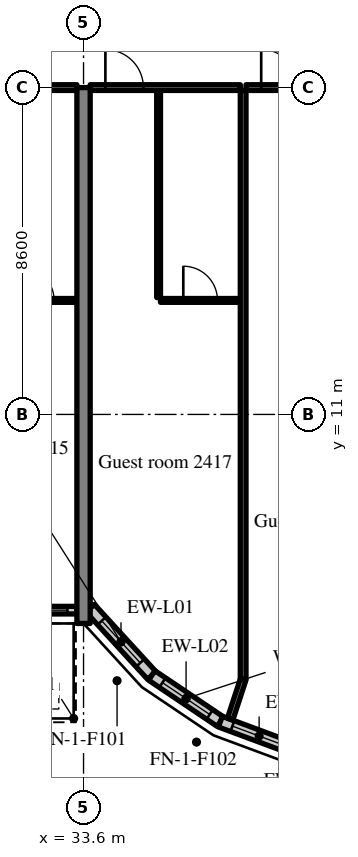
"""IFC4 building model, lengths in metres.
Left out: names, types, materials, properties, quantities, classifications, styles, units other than length and angle.
Written with IfcOpenShell. Run it as: python <this file> out.ifc"""

import sys

from ifc_helpers import new_model, si_unit, direction, frame, frame_2d, origin, place, context, subcontext, project, spatial, rectangle, extrude, source, transform, mapped, element, fill, save


model = new_model("IFC4")
c1 = context("Model", 3, precision=1e-05, world=origin(), true_north=direction((0.0, 1.0)))
c2 = subcontext(c1, "Body", "Model", "MODEL_VIEW")
j1 = project(units=[si_unit("LENGTHUNIT", "METRE"), si_unit("PLANEANGLEUNIT", "RADIAN")], contexts=[c1])
p1 = place(None, origin())
s1 = spatial("IfcSite", under=j1, at=p1, CompositionType="ELEMENT")
p2 = place(p1, origin())
s2 = spatial("IfcBuilding", under=s1, at=p2, CompositionType="ELEMENT")
p3 = place(p2, frame((0.0, 0.0, 102.8)))
s3 = spatial("IfcBuildingStorey", under=s2, at=p3, CompositionType="ELEMENT", Elevation=102.8)
m1 = source(origin(), c2, "Body", "SweptSolid", [
    extrude(rectangle(XDim=14.1, YDim=0.35, at=frame_2d((7.05, 0.0))), origin(), (0.0, 0.0, 1.0), 3.52),
])
p4 = place(p3, frame((33.6, 5.5, 0.0), z_axis=(0.0, 0.0, 1.0), x_axis=(0.0, 1.0, 0.0)))
e1 = element("IfcWall", 1, at=p4, inside=s3, PredefinedType="SHEAR", context=c2, shape_type="MappedRepresentation", body=[
    mapped(m1, transform((0.0, 0.0, 0.0), scale=1.0)),
])
m2 = source(origin(), c2, "Body", "SweptSolid", [
    extrude(rectangle(XDim=8.05, YDim=0.2, at=frame_2d((4.025, 0.0))), origin(), (0.0, 0.0, 1.0), 2.82),
])
p5 = place(p3, frame((25.375, 5.85, 0.0), z_axis=(0.0, 0.0, 1.0), x_axis=(1.0, 0.0, 0.0)))
e2 = element("IfcWall", 2, at=p5, inside=s3, PredefinedType="SOLIDWALL", context=c2, shape_type="MappedRepresentation", body=[
    mapped(m2, transform((0.0, 0.0, 0.0), scale=1.0)),
])
m3 = source(origin(), c2, "Body", "SweptSolid", [
    extrude(rectangle(XDim=1.2, YDim=2.4, at=frame_2d((0.6, 1.2))), frame((0.0, 0.11, 0.0), z_axis=(0.0, -1.0, 0.0), x_axis=(1.0, 0.0, 0.0)), (0.0, 0.0, 1.0), 0.22),
])
p6 = place(p5, frame((0.25, 0.0, 0.0)))
e3 = element("IfcOpeningElement", 3, at=p6, cuts=e2, PredefinedType="OPENING", context=c2, shape_type="MappedRepresentation", body=[
    mapped(m3, transform((0.0, 0.0, 0.0), scale=1.0)),
])
m4 = source(origin(), c2, "Body", "SweptSolid", [
    extrude(rectangle(XDim=1.5, YDim=1.5, at=frame_2d((0.75, 0.75))), frame((0.0, 0.11, 0.0), z_axis=(0.0, -1.0, 0.0), x_axis=(1.0, 0.0, 0.0)), (0.0, 0.0, 1.0), 0.22),
])
p7 = place(p5, frame((2.275, 0.0, 0.9)))
e4 = element("IfcOpeningElement", 4, at=p7, cuts=e2, PredefinedType="OPENING", context=c2, shape_type="MappedRepresentation", body=[
    mapped(m4, transform((0.0, 0.0, 0.0), scale=1.0)),
])
p8 = place(p5, frame((4.275, 0.0, 0.0)))
e5 = element("IfcOpeningElement", 5, at=p8, cuts=e2, PredefinedType="OPENING", context=c2, shape_type="MappedRepresentation", body=[
    mapped(m3, transform((0.0, 0.0, 0.0), scale=1.0)),
])
p9 = place(p5, frame((6.3, 0.0, 0.9)))
e6 = element("IfcOpeningElement", 6, at=p9, cuts=e2, PredefinedType="OPENING", context=c2, shape_type="MappedRepresentation", body=[
    mapped(m4, transform((0.0, 0.0, 0.0), scale=1.0)),
])
m5 = source(origin(), c2, "Body", "SweptSolid", [
    extrude(rectangle(XDim=2.398, YDim=0.3, at=frame_2d((1.199, 0.0))), origin(), (0.0, 0.0, 1.0), 3.52),
])
p10 = place(p3, frame((33.776, 5.9, 0.0), z_axis=(0.0, 0.0, 1.0), x_axis=(0.675374189419, -0.737475222815, 0.0)))
e7 = element("IfcWall", 7, at=p10, inside=s3, PredefinedType="SOLIDWALL", context=c2, shape_type="MappedRepresentation", body=[
    mapped(m5, transform((0.0, 0.0, 0.0), scale=1.0)),
])
m6 = source(origin(), c2, "Body", "SweptSolid", [
    extrude(rectangle(XDim=1.5, YDim=2.0, at=frame_2d((0.75, 1.0))), frame((0.0, 0.16, 0.0), z_axis=(0.0, -1.0, 0.0), x_axis=(1.0, 0.0, 0.0)), (0.0, 0.0, 1.0), 0.32),
])
p11 = place(p10, frame((0.449, 0.0, 0.9)))
e8 = element("IfcOpeningElement", 8, at=p11, cuts=e7, PredefinedType="OPENING", context=c2, shape_type="MappedRepresentation", body=[
    mapped(m6, transform((0.0, 0.0, 0.0), scale=1.0)),
])
m7 = source(origin(), c2, "Body", "SweptSolid", [
    extrude(rectangle(XDim=2.176, YDim=0.3, at=frame_2d((1.088, 0.0))), origin(), (0.0, 0.0, 1.0), 3.52),
])
p12 = place(p3, frame((35.396, 4.131, 0.0), z_axis=(0.0, 0.0, 1.0), x_axis=(0.829590746428, -0.558371913192, 0.0)))
e9 = element("IfcWall", 9, at=p12, inside=s3, PredefinedType="SOLIDWALL", context=c2, shape_type="MappedRepresentation", body=[
    mapped(m7, transform((0.0, 0.0, 0.0), scale=1.0)),
])
p13 = place(p12, frame((0.338, 0.0, 0.9)))
e10 = element("IfcOpeningElement", 10, at=p13, cuts=e9, PredefinedType="OPENING", context=c2, shape_type="MappedRepresentation", body=[
    mapped(m6, transform((0.0, 0.0, 0.0), scale=1.0)),
])
p14 = place(p3, frame((37.201, 2.917, 0.0), z_axis=(0.0, 0.0, 1.0), x_axis=(0.93754555999, -0.347862505801, 0.0)))
e11 = element("IfcWall", 11, at=p14, inside=s3, PredefinedType="SOLIDWALL", context=c2, shape_type="MappedRepresentation", body=[
    mapped(m7, transform((0.0, 0.0, 0.0), scale=1.0)),
])
p15 = place(p14, frame((0.338, 0.0, 0.9)))
e12 = element("IfcOpeningElement", 12, at=p15, cuts=e11, PredefinedType="OPENING", context=c2, shape_type="MappedRepresentation", body=[
    mapped(m6, transform((0.0, 0.0, 0.0), scale=1.0)),
])
m8 = source(origin(), c2, "Body", "SweptSolid", [
    extrude(rectangle(XDim=2.1, YDim=0.1, at=frame_2d((1.05, 0.0))), origin(), (0.0, 0.0, 1.0), 3.52),
])
p16 = place(p3, frame((31.325, 14.0, 0.0), z_axis=(0.0, 0.0, 1.0), x_axis=(1.0, 0.0, 0.0)))
e13 = element("IfcWall", 13, at=p16, inside=s3, PredefinedType="PARTITIONING", context=c2, shape_type="MappedRepresentation", body=[
    mapped(m8, transform((0.0, 0.0, 0.0), scale=1.0)),
])
m9 = source(origin(), c2, "Body", "SweptSolid", [
    extrude(rectangle(XDim=0.9, YDim=2.1, at=frame_2d((0.45, 1.05))), frame((0.0, 0.06, 0.0), z_axis=(0.0, -1.0, 0.0), x_axis=(1.0, 0.0, 0.0)), (0.0, 0.0, 1.0), 0.12),
])
p17 = place(p16, frame((0.6, 0.0, 0.0)))
e14 = element("IfcOpeningElement", 14, at=p17, cuts=e13, PredefinedType="OPENING", context=c2, shape_type="MappedRepresentation", body=[
    mapped(m9, transform((0.0, 0.0, 0.0), scale=1.0)),
])
m10 = source(origin(), c2, "Body", "SweptSolid", [
    extrude(rectangle(XDim=3.95, YDim=0.15, at=frame_2d((1.975, 0.0))), origin(), (0.0, 0.0, 1.0), 2.82),
])
p18 = place(p3, frame((29.475, 19.6, 0.0), z_axis=(0.0, 0.0, 1.0), x_axis=(1.0, 0.0, 0.0)))
e15 = element("IfcWall", 15, at=p18, inside=s3, PredefinedType="PARTITIONING", context=c2, shape_type="MappedRepresentation", body=[
    mapped(m10, transform((0.0, 0.0, 0.0), scale=1.0)),
])
m11 = source(origin(), c2, "Body", "SweptSolid", [
    extrude(rectangle(XDim=1.0, YDim=2.1, at=frame_2d((0.5, 1.05))), frame((0.0, 0.085, 0.0), z_axis=(0.0, -1.0, 0.0), x_axis=(1.0, 0.0, 0.0)), (0.0, 0.0, 1.0), 0.17),
])
p19 = place(p18, frame((0.4, 0.0, 0.0)))
e16 = element("IfcOpeningElement", 16, at=p19, cuts=e15, PredefinedType="OPENING", context=c2, shape_type="MappedRepresentation", body=[
    mapped(m11, transform((0.0, 0.0, 0.0), scale=1.0)),
])
m12 = source(origin(), c2, "Body", "SweptSolid", [
    extrude(rectangle(XDim=5.45, YDim=0.1, at=frame_2d((2.725, 0.0))), origin(), (0.0, 0.0, 1.0), 3.52),
])
p20 = place(p3, frame((35.575, 14.075, 0.0), z_axis=(0.0, 0.0, 1.0), x_axis=(0.0, 1.0, 0.0)))
e17 = element("IfcWall", 17, at=p20, inside=s3, PredefinedType="PARTITIONING", context=c2, shape_type="MappedRepresentation", body=[
    mapped(m12, transform((0.0, 0.0, 0.0), scale=1.0)),
])
p21 = place(p3, frame((35.625, 14.0, 0.0), z_axis=(0.0, 0.0, 1.0), x_axis=(1.0, 0.0, 0.0)))
e18 = element("IfcWall", 18, at=p21, inside=s3, PredefinedType="PARTITIONING", context=c2, shape_type="MappedRepresentation", body=[
    mapped(m8, transform((0.0, 0.0, 0.0), scale=1.0)),
])
p22 = place(p21, frame((0.6, 0.0, 0.0)))
e19 = element("IfcOpeningElement", 19, at=p22, cuts=e18, PredefinedType="OPENING", context=c2, shape_type="MappedRepresentation", body=[
    mapped(m9, transform((0.0, 0.0, 0.0), scale=1.0)),
])
m13 = source(origin(), c2, "Body", "SweptSolid", [
    extrude(rectangle(XDim=3.95, YDim=0.15, at=frame_2d((1.975, 0.0))), origin(), (0.0, 0.0, 1.0), 2.82),
])
p23 = place(p3, frame((33.775, 19.6, 0.0), z_axis=(0.0, 0.0, 1.0), x_axis=(1.0, 0.0, 0.0)))
e20 = element("IfcWall", 20, at=p23, inside=s3, PredefinedType="PARTITIONING", context=c2, shape_type="MappedRepresentation", body=[
    mapped(m13, transform((0.0, 0.0, 0.0), scale=1.0)),
])
p24 = place(p23, frame((0.4, 0.0, 0.0)))
e21 = element("IfcOpeningElement", 21, at=p24, cuts=e20, PredefinedType="OPENING", context=c2, shape_type="MappedRepresentation", body=[
    mapped(m11, transform((0.0, 0.0, 0.0), scale=1.0)),
])
p25 = place(p3, frame((37.875, 19.6, 0.0), z_axis=(0.0, 0.0, 1.0), x_axis=(1.0, 0.0, 0.0)))
e22 = element("IfcWall", 22, at=p25, inside=s3, PredefinedType="PARTITIONING", context=c2, shape_type="MappedRepresentation", body=[
    mapped(m10, transform((0.0, 0.0, 0.0), scale=1.0)),
])
p26 = place(p25, frame((0.4, 0.0, 0.0)))
e23 = element("IfcOpeningElement", 23, at=p26, cuts=e22, PredefinedType="OPENING", context=c2, shape_type="MappedRepresentation", body=[
    mapped(m11, transform((0.0, 0.0, 0.0), scale=1.0)),
])
m14 = source(origin(), c2, "Body", "SweptSolid", [
    extrude(rectangle(XDim=15.498, YDim=0.15, at=frame_2d((7.749, 0.0))), origin(), (0.0, 0.0, 1.0), 3.52),
])
p27 = place(p3, frame((37.8, 4.027, 0.0), z_axis=(0.0, 0.0, 1.0), x_axis=(0.0, 1.0, 0.0)))
e24 = element("IfcWall", 24, at=p27, inside=s3, PredefinedType="PARTITIONING", context=c2, shape_type="MappedRepresentation", body=[
    mapped(m14, transform((0.0, 0.0, 0.0), scale=1.0)),
])
m15 = source(origin(), c2, "Body", "SweptSolid", [
    extrude(rectangle(XDim=1.101, YDim=0.15, at=frame_2d((0.55, 0.0))), origin(), (0.0, 0.0, 1.0), 3.52),
])
p28 = place(p3, frame((37.457, 2.981, 0.0), z_axis=(0.0, 0.0, 1.0), x_axis=(0.311567081539, 0.950224159712, 0.0)))
e25 = element("IfcWall", 25, at=p28, inside=s3, PredefinedType="PARTITIONING", context=c2, shape_type="MappedRepresentation", body=[
    mapped(m15, transform((0.0, 0.0, 0.0), scale=1.0)),
])
m16 = source(origin(), c2, "Body", "SweptSolid", [
    extrude(rectangle(XDim=1.5, YDim=1.5, at=frame_2d((0.75, 0.75))), frame((0.0, 0.03, 0.0), z_axis=(0.0, -1.0, 0.0), x_axis=(1.0, 0.0, 0.0)), (0.0, 0.0, 1.0), 0.06),
])
p29 = place(p9, origin())
e26 = element("IfcWindow", 26, at=p29, inside=s3, PartitioningType="SINGLE_PANEL", PredefinedType="WINDOW", context=c2, shape_type="MappedRepresentation", body=[
    mapped(m16, transform((0.0, 0.0, 0.0), scale=1.0)),
])
fill(e6, e26)
m17 = source(origin(), c2, "Body", "SweptSolid", [
    extrude(rectangle(XDim=1.5, YDim=2.0, at=frame_2d((0.75, 1.0))), frame((0.0, 0.03, 0.0), z_axis=(0.0, -1.0, 0.0), x_axis=(1.0, 0.0, 0.0)), (0.0, 0.0, 1.0), 0.06),
])
p30 = place(p11, origin())
e27 = element("IfcWindow", 27, at=p30, inside=s3, PartitioningType="SINGLE_PANEL", PredefinedType="WINDOW", context=c2, shape_type="MappedRepresentation", body=[
    mapped(m17, transform((0.0, 0.0, 0.0), scale=1.0)),
])
fill(e8, e27)
p31 = place(p13, origin())
e28 = element("IfcWindow", 28, at=p31, inside=s3, PartitioningType="SINGLE_PANEL", PredefinedType="WINDOW", context=c2, shape_type="MappedRepresentation", body=[
    mapped(m17, transform((0.0, 0.0, 0.0), scale=1.0)),
])
fill(e10, e28)
p32 = place(p15, origin())
e29 = element("IfcWindow", 29, at=p32, inside=s3, PartitioningType="SINGLE_PANEL", PredefinedType="WINDOW", context=c2, shape_type="MappedRepresentation", body=[
    mapped(m17, transform((0.0, 0.0, 0.0), scale=1.0)),
])
fill(e12, e29)
m18 = source(origin(), c2, "Body", "SweptSolid", [
    extrude(rectangle(XDim=0.9, YDim=2.1, at=frame_2d((0.45, 1.05))), frame((0.0, 0.025, 0.0), z_axis=(0.0, -1.0, 0.0), x_axis=(1.0, 0.0, 0.0)), (0.0, 0.0, 1.0), 0.05),
])
p33 = place(p17, origin())
e30 = element("IfcDoor", 30, at=p33, inside=s3, OperationType="SINGLE_SWING_LEFT", PredefinedType="DOOR", context=c2, shape_type="MappedRepresentation", body=[
    mapped(m18, transform((0.0, 0.0, 0.0), scale=1.0)),
])
fill(e14, e30)
p34 = place(p22, origin())
e31 = element("IfcDoor", 31, at=p34, inside=s3, OperationType="SINGLE_SWING_LEFT", PredefinedType="DOOR", context=c2, shape_type="MappedRepresentation", body=[
    mapped(m18, transform((0.0, 0.0, 0.0), scale=1.0)),
])
fill(e19, e31)
m19 = source(origin(), c2, "Body", "SweptSolid", [
    extrude(rectangle(XDim=1.0, YDim=2.1, at=frame_2d((0.5, 1.05))), frame((0.0, 0.025, 0.0), z_axis=(0.0, -1.0, 0.0), x_axis=(1.0, 0.0, 0.0)), (0.0, 0.0, 1.0), 0.05),
])
p35 = place(p24, origin())
e32 = element("IfcDoor", 32, at=p35, inside=s3, OperationType="SINGLE_SWING_LEFT", PredefinedType="DOOR", context=c2, shape_type="MappedRepresentation", body=[
    mapped(m19, transform((0.0, 0.0, 0.0), scale=1.0)),
])
fill(e21, e32)
p36 = place(p26, origin())
e33 = element("IfcDoor", 33, at=p36, inside=s3, OperationType="SINGLE_SWING_LEFT", PredefinedType="DOOR", context=c2, shape_type="MappedRepresentation", body=[
    mapped(m19, transform((0.0, 0.0, 0.0), scale=1.0)),
])
fill(e23, e33)
save(model, sys.argv[1])
